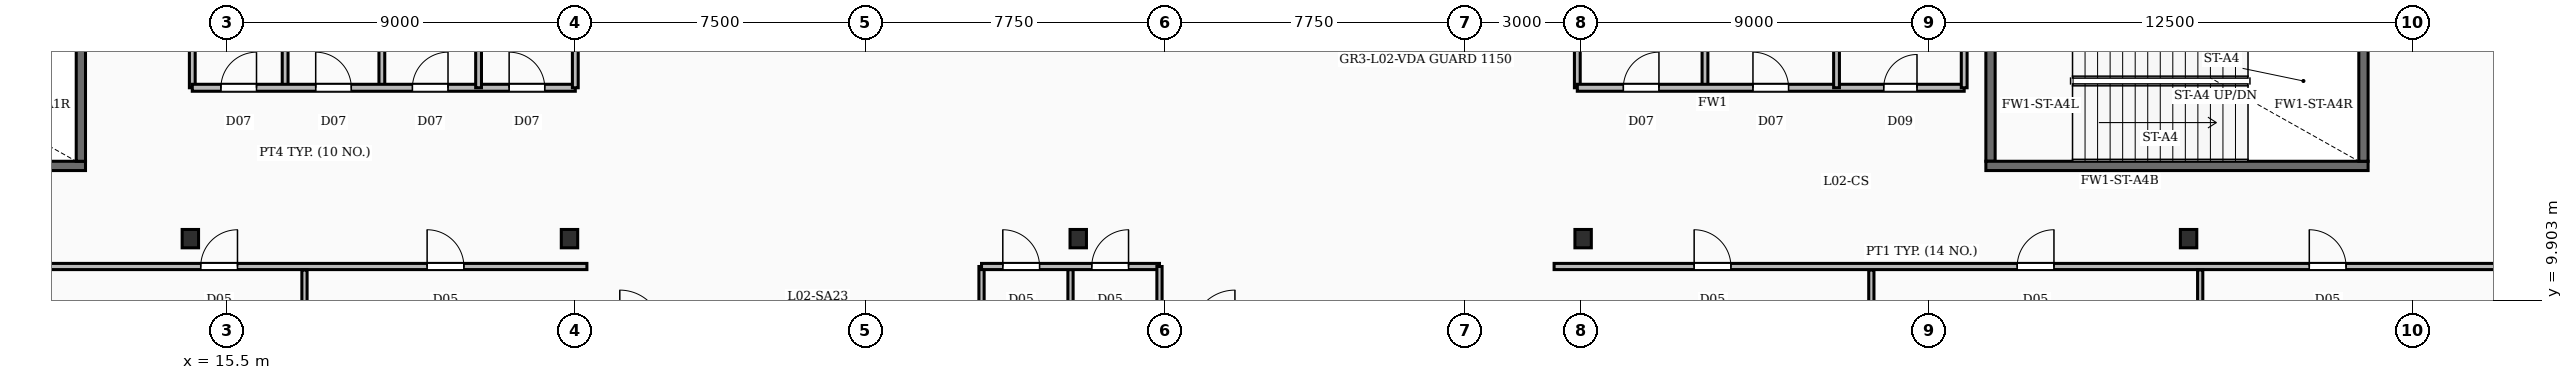
"""IFC4 building model, lengths in metres.
Left out: names, types, materials, properties, quantities, classifications, styles, units other than length and angle.
Written with IfcOpenShell. Run it as: python <this file> out.ifc"""

import sys

from ifc_helpers import new_model, si_unit, direction, frame, frame_2d, origin, origin_2d, place, context, subcontext, project, spatial, rectangle, i_section, extrude, element, fill, save


model = new_model("IFC4")
c1 = context("Model", 3, precision=1e-05, world=origin(), true_north=direction((0.0, 1.0)))
c2 = subcontext(c1, "Body", "Model", "MODEL_VIEW")
j1 = project(units=[si_unit("LENGTHUNIT", "METRE"), si_unit("PLANEANGLEUNIT", "RADIAN")], contexts=[c1])
p1 = place(None, origin())
s1 = spatial("IfcSite", under=j1, at=p1, CompositionType="ELEMENT")
p2 = place(p1, origin())
s2 = spatial("IfcBuilding", under=s1, at=p2, CompositionType="ELEMENT")
p3 = place(p2, frame((0.0, 0.0, 13.0)))
s3 = spatial("IfcBuildingStorey", under=s2, at=p3, CompositionType="ELEMENT", Elevation=13.0)
for number, where, z_axis, x_axis in (
    (1, (14.55, 11.5, -0.35), (0.0, 0.0, 1.0), (1.0, 0.0, 0.0)),
    (2, (24.35, 11.5, -0.35), (0.0, 0.0, 1.0), (1.0, 0.0, 0.0)),
    (3, (37.5, 11.5, -0.35), (0.0, 0.0, 1.0), (1.0, 0.0, 0.0)),
    (4, (50.55, 11.5, -0.35), (0.0, 0.0, 1.0), (1.0, 0.0, 0.0)),
    (5, (66.2, 11.5, -0.35), (0.0, 0.0, 1.0), (1.0, 0.0, 0.0)),
):
    element("IfcColumn", number, at=place(p3, frame(where, z_axis=z_axis, x_axis=x_axis)), inside=s3, PredefinedType="COLUMN", context=c2, shape_type="SweptSolid", body=[
        extrude(i_section(OverallWidth=0.424, OverallDepth=0.474, WebThickness=0.048, FlangeThickness=0.077, FilletRadius=0.02, at=origin_2d()), origin(), (0.0, 0.0, 1.0), 5.0),
    ])
p4 = place(p3, frame((1.96, 13.38, 0.0), z_axis=(0.0, 0.0, 1.0), x_axis=(1.0, 0.0, 0.0)))
e6 = element("IfcWall", 6, at=p4, inside=s3, PredefinedType="SOLIDWALL", context=c2, shape_type="SweptSolid", body=[
    extrude(rectangle(XDim=9.88, YDim=0.24, at=frame_2d((4.94, 0.0))), origin(), (0.0, 0.0, 1.0), 4.65),
])
p5 = place(p3, frame((11.72, 13.5, 0.0), z_axis=(0.0, 0.0, 1.0), x_axis=(0.0, 1.0, 0.0)))
e7 = element("IfcWall", 7, at=p5, inside=s3, PredefinedType="SOLIDWALL", context=c2, shape_type="SweptSolid", body=[
    extrude(rectangle(XDim=4.15, YDim=0.24, at=frame_2d((2.075, 0.0))), origin(), (0.0, 0.0, 1.0), 4.65),
])
p6 = place(p3, frame((60.96, 13.38, 0.0), z_axis=(0.0, 0.0, 1.0), x_axis=(1.0, 0.0, 0.0)))
e8 = element("IfcWall", 8, at=p6, inside=s3, PredefinedType="SOLIDWALL", context=c2, shape_type="SweptSolid", body=[
    extrude(rectangle(XDim=9.88, YDim=0.24, at=frame_2d((4.94, 0.0))), origin(), (0.0, 0.0, 1.0), 4.65),
])
for number, where, z_axis, x_axis in (
    (9, (61.08, 13.5, 0.0), (0.0, 0.0, 1.0), (0.0, 1.0, 0.0)),
    (10, (70.72, 13.5, 0.0), (0.0, 0.0, 1.0), (0.0, 1.0, 0.0)),
):
    element("IfcWall", number, at=place(p3, frame(where, z_axis=z_axis, x_axis=x_axis)), inside=s3, PredefinedType="SOLIDWALL", context=c2, shape_type="SweptSolid", body=[
        extrude(rectangle(XDim=4.15, YDim=0.24, at=frame_2d((2.075, 0.0))), origin(), (0.0, 0.0, 1.0), 4.65),
    ])
for number, where, z_axis, x_axis in (
    (11, (17.0, 15.4, 0.0), (0.0, 0.0, 1.0), (0.0, 1.0, 0.0)),
    (12, (19.5, 15.4, 0.0), (0.0, 0.0, 1.0), (0.0, 1.0, 0.0)),
    (13, (22.0, 15.4, 0.0), (0.0, 0.0, 1.0), (0.0, 1.0, 0.0)),
):
    element("IfcWall", number, at=place(p3, frame(where, z_axis=z_axis, x_axis=x_axis)), inside=s3, PredefinedType="PARTITIONING", context=c2, shape_type="SweptSolid", body=[
        extrude(rectangle(XDim=3.58, YDim=0.15, at=frame_2d((1.79, 0.0))), origin(), (0.0, 0.0, 1.0), 3.71),
    ])
p7 = place(p3, frame((14.6, 15.4, 0.0), z_axis=(0.0, 0.0, 1.0), x_axis=(1.0, 0.0, 0.0)))
e14 = element("IfcWall", 14, at=p7, inside=s3, PredefinedType="PARTITIONING", context=c2, shape_type="SweptSolid", body=[
    extrude(rectangle(XDim=9.9, YDim=0.18, at=frame_2d((4.95, 0.0))), origin(), (0.0, 0.0, 1.0), 3.71),
])
p8 = place(p7, frame((0.74, 0.0, 0.0)))
e15 = element("IfcOpeningElement", 15, at=p8, cuts=e14, PredefinedType="OPENING", context=c2, shape_type="SweptSolid", body=[
    extrude(rectangle(XDim=0.92, YDim=2.1, at=frame_2d((0.46, 1.05))), frame((0.0, 0.1, 0.0), z_axis=(0.0, -1.0, 0.0), x_axis=(1.0, 0.0, 0.0)), (0.0, 0.0, 1.0), 0.2),
])
p9 = place(p7, frame((3.19, 0.0, 0.0)))
e16 = element("IfcOpeningElement", 16, at=p9, cuts=e14, PredefinedType="OPENING", context=c2, shape_type="SweptSolid", body=[
    extrude(rectangle(XDim=0.92, YDim=2.1, at=frame_2d((0.46, 1.05))), frame((0.0, 0.1, 0.0), z_axis=(0.0, -1.0, 0.0), x_axis=(1.0, 0.0, 0.0)), (0.0, 0.0, 1.0), 0.2),
])
p10 = place(p7, frame((5.69, 0.0, 0.0)))
e17 = element("IfcOpeningElement", 17, at=p10, cuts=e14, PredefinedType="OPENING", context=c2, shape_type="SweptSolid", body=[
    extrude(rectangle(XDim=0.92, YDim=2.1, at=frame_2d((0.46, 1.05))), frame((0.0, 0.1, 0.0), z_axis=(0.0, -1.0, 0.0), x_axis=(1.0, 0.0, 0.0)), (0.0, 0.0, 1.0), 0.2),
])
p11 = place(p7, frame((8.19, 0.0, 0.0)))
e18 = element("IfcOpeningElement", 18, at=p11, cuts=e14, PredefinedType="OPENING", context=c2, shape_type="SweptSolid", body=[
    extrude(rectangle(XDim=0.92, YDim=2.1, at=frame_2d((0.46, 1.05))), frame((0.0, 0.1, 0.0), z_axis=(0.0, -1.0, 0.0), x_axis=(1.0, 0.0, 0.0)), (0.0, 0.0, 1.0), 0.2),
])
for number, where, z_axis, x_axis in (
    (19, (14.6, 15.4, 0.0), (0.0, 0.0, 1.0), (0.0, 1.0, 0.0)),
    (20, (24.5, 15.4, 0.0), (0.0, 0.0, 1.0), (0.0, 1.0, 0.0)),
    (21, (53.7, 15.4, 0.0), (0.0, 0.0, 1.0), (0.0, 1.0, 0.0)),
    (22, (57.1, 15.4, 0.0), (0.0, 0.0, 1.0), (0.0, 1.0, 0.0)),
):
    element("IfcWall", number, at=place(p3, frame(where, z_axis=z_axis, x_axis=x_axis)), inside=s3, PredefinedType="PARTITIONING", context=c2, shape_type="SweptSolid", body=[
        extrude(rectangle(XDim=3.58, YDim=0.15, at=frame_2d((1.79, 0.0))), origin(), (0.0, 0.0, 1.0), 3.71),
    ])
p12 = place(p3, frame((50.4, 15.4, 0.0), z_axis=(0.0, 0.0, 1.0), x_axis=(1.0, 0.0, 0.0)))
e23 = element("IfcWall", 23, at=p12, inside=s3, PredefinedType="SOLIDWALL", context=c2, shape_type="SweptSolid", body=[
    extrude(rectangle(XDim=10.0, YDim=0.18, at=frame_2d((5.0, 0.0))), origin(), (0.0, 0.0, 1.0), 3.71),
])
p13 = place(p12, frame((1.19, 0.0, 0.0)))
e24 = element("IfcOpeningElement", 24, at=p13, cuts=e23, PredefinedType="OPENING", context=c2, shape_type="SweptSolid", body=[
    extrude(rectangle(XDim=0.92, YDim=2.1, at=frame_2d((0.46, 1.05))), frame((0.0, 0.1, 0.0), z_axis=(0.0, -1.0, 0.0), x_axis=(1.0, 0.0, 0.0)), (0.0, 0.0, 1.0), 0.2),
])
p14 = place(p12, frame((4.54, 0.0, 0.0)))
e25 = element("IfcOpeningElement", 25, at=p14, cuts=e23, PredefinedType="OPENING", context=c2, shape_type="SweptSolid", body=[
    extrude(rectangle(XDim=0.92, YDim=2.1, at=frame_2d((0.46, 1.05))), frame((0.0, 0.1, 0.0), z_axis=(0.0, -1.0, 0.0), x_axis=(1.0, 0.0, 0.0)), (0.0, 0.0, 1.0), 0.2),
])
p15 = place(p12, frame((7.92, 0.0, 0.0)))
e26 = element("IfcOpeningElement", 26, at=p15, cuts=e23, PredefinedType="OPENING", context=c2, shape_type="SweptSolid", body=[
    extrude(rectangle(XDim=0.86, YDim=2.05, at=frame_2d((0.43, 1.025))), frame((0.0, 0.1, 0.0), z_axis=(0.0, -1.0, 0.0), x_axis=(1.0, 0.0, 0.0)), (0.0, 0.0, 1.0), 0.2),
])
for number, where, z_axis, x_axis in (
    (27, (50.4, 15.4, 0.0), (0.0, 0.0, 1.0), (0.0, 1.0, 0.0)),
    (28, (60.4, 15.4, 0.0), (0.0, 0.0, 1.0), (0.0, 1.0, 0.0)),
):
    element("IfcWall", number, at=place(p3, frame(where, z_axis=z_axis, x_axis=x_axis)), inside=s3, PredefinedType="PARTITIONING", context=c2, shape_type="SweptSolid", body=[
        extrude(rectangle(XDim=3.58, YDim=0.15, at=frame_2d((1.79, 0.0))), origin(), (0.0, 0.0, 1.0), 3.71),
    ])
p16 = place(p3, frame((17.5, 0.0, 0.0), z_axis=(0.0, 0.0, 1.0), x_axis=(0.0, 1.0, 0.0)))
e29 = element("IfcWall", 29, at=p16, inside=s3, PredefinedType="PARTITIONING", context=c2, shape_type="SweptSolid", body=[
    extrude(rectangle(XDim=10.69, YDim=0.135, at=frame_2d((5.345, 0.0))), origin(), (0.0, 0.0, 1.0), 3.71),
])
p17 = place(p16, frame((2.2, 0.0, 0.0)))
e30 = element("IfcOpeningElement", 30, at=p17, cuts=e29, PredefinedType="OPENING", context=c2, shape_type="SweptSolid", body=[
    extrude(rectangle(XDim=0.95, YDim=2.15, at=frame_2d((0.475, 1.075))), frame((0.0, 0.077, 0.0), z_axis=(0.0, -1.0, 0.0), x_axis=(1.0, 0.0, 0.0)), (0.0, 0.0, 1.0), 0.155),
])
p18 = place(p3, frame((0.0, 10.78, 0.0), z_axis=(0.0, 0.0, 1.0), x_axis=(1.0, 0.0, 0.0)))
e31 = element("IfcWall", 31, at=p18, inside=s3, PredefinedType="PARTITIONING", context=c2, shape_type="SweptSolid", body=[
    extrude(rectangle(XDim=24.8, YDim=0.16, at=frame_2d((12.4, 0.0))), origin(), (0.0, 0.0, 1.0), 3.71),
])
p19 = place(p18, frame((14.818, 0.0, 0.0)))
e32 = element("IfcOpeningElement", 32, at=p19, cuts=e31, PredefinedType="OPENING", context=c2, shape_type="SweptSolid", body=[
    extrude(rectangle(XDim=0.95, YDim=2.15, at=frame_2d((0.475, 1.075))), frame((0.0, 0.09, 0.0), z_axis=(0.0, -1.0, 0.0), x_axis=(1.0, 0.0, 0.0)), (0.0, 0.0, 1.0), 0.18),
])
p20 = place(p18, frame((20.67, 0.0, 0.0)))
e33 = element("IfcOpeningElement", 33, at=p20, cuts=e31, PredefinedType="OPENING", context=c2, shape_type="SweptSolid", body=[
    extrude(rectangle(XDim=0.95, YDim=2.15, at=frame_2d((0.475, 1.075))), frame((0.0, 0.09, 0.0), z_axis=(0.0, -1.0, 0.0), x_axis=(1.0, 0.0, 0.0)), (0.0, 0.0, 1.0), 0.18),
])
p21 = place(p3, frame((58.0, 0.0, 0.0), z_axis=(0.0, 0.0, 1.0), x_axis=(0.0, 1.0, 0.0)))
e34 = element("IfcWall", 34, at=p21, inside=s3, PredefinedType="PARTITIONING", context=c2, shape_type="SweptSolid", body=[
    extrude(rectangle(XDim=10.69, YDim=0.135, at=frame_2d((5.345, 0.0))), origin(), (0.0, 0.0, 1.0), 3.71),
])
p22 = place(p21, frame((2.2, 0.0, 0.0)))
e35 = element("IfcOpeningElement", 35, at=p22, cuts=e34, PredefinedType="OPENING", context=c2, shape_type="SweptSolid", body=[
    extrude(rectangle(XDim=0.95, YDim=2.15, at=frame_2d((0.475, 1.075))), frame((0.0, 0.077, 0.0), z_axis=(0.0, -1.0, 0.0), x_axis=(1.0, 0.0, 0.0)), (0.0, 0.0, 1.0), 0.155),
])
p23 = place(p3, frame((66.5, 0.0, 0.0), z_axis=(0.0, 0.0, 1.0), x_axis=(0.0, 1.0, 0.0)))
e36 = element("IfcWall", 36, at=p23, inside=s3, PredefinedType="PARTITIONING", context=c2, shape_type="SweptSolid", body=[
    extrude(rectangle(XDim=10.69, YDim=0.135, at=frame_2d((5.345, 0.0))), origin(), (0.0, 0.0, 1.0), 3.71),
])
p24 = place(p23, frame((2.2, 0.0, 0.0)))
e37 = element("IfcOpeningElement", 37, at=p24, cuts=e36, PredefinedType="OPENING", context=c2, shape_type="SweptSolid", body=[
    extrude(rectangle(XDim=0.95, YDim=2.15, at=frame_2d((0.475, 1.075))), frame((0.0, 0.077, 0.0), z_axis=(0.0, -1.0, 0.0), x_axis=(1.0, 0.0, 0.0)), (0.0, 0.0, 1.0), 0.155),
])
p25 = place(p3, frame((49.8, 10.78, 0.0), z_axis=(0.0, 0.0, 1.0), x_axis=(1.0, 0.0, 0.0)))
e38 = element("IfcWall", 38, at=p25, inside=s3, PredefinedType="PARTITIONING", context=c2, shape_type="SweptSolid", body=[
    extrude(rectangle(XDim=29.7, YDim=0.16, at=frame_2d((14.85, 0.0))), origin(), (0.0, 0.0, 1.0), 3.71),
])
p26 = place(p25, frame((3.62, 0.0, 0.0)))
e39 = element("IfcOpeningElement", 39, at=p26, cuts=e38, PredefinedType="OPENING", context=c2, shape_type="SweptSolid", body=[
    extrude(rectangle(XDim=0.95, YDim=2.15, at=frame_2d((0.475, 1.075))), frame((0.0, 0.09, 0.0), z_axis=(0.0, -1.0, 0.0), x_axis=(1.0, 0.0, 0.0)), (0.0, 0.0, 1.0), 0.18),
])
p27 = place(p25, frame((11.97, 0.0, 0.0)))
e40 = element("IfcOpeningElement", 40, at=p27, cuts=e38, PredefinedType="OPENING", context=c2, shape_type="SweptSolid", body=[
    extrude(rectangle(XDim=0.95, YDim=2.15, at=frame_2d((0.475, 1.075))), frame((0.0, 0.09, 0.0), z_axis=(0.0, -1.0, 0.0), x_axis=(1.0, 0.0, 0.0)), (0.0, 0.0, 1.0), 0.18),
])
p28 = place(p25, frame((19.52, 0.0, 0.0)))
e41 = element("IfcOpeningElement", 41, at=p28, cuts=e38, PredefinedType="OPENING", context=c2, shape_type="SweptSolid", body=[
    extrude(rectangle(XDim=0.95, YDim=2.15, at=frame_2d((0.475, 1.075))), frame((0.0, 0.09, 0.0), z_axis=(0.0, -1.0, 0.0), x_axis=(1.0, 0.0, 0.0)), (0.0, 0.0, 1.0), 0.18),
])
p29 = place(p3, frame((35.0, 10.78, 0.0), z_axis=(0.0, 0.0, 1.0), x_axis=(1.0, 0.0, 0.0)))
e42 = element("IfcWall", 42, at=p29, inside=s3, PredefinedType="PARTITIONING", context=c2, shape_type="SweptSolid", body=[
    extrude(rectangle(XDim=4.6, YDim=0.16, at=frame_2d((2.3, 0.0))), origin(), (0.0, 0.0, 1.0), 3.71),
])
p30 = place(p29, frame((0.55, 0.0, 0.0)))
e43 = element("IfcOpeningElement", 43, at=p30, cuts=e42, PredefinedType="OPENING", context=c2, shape_type="SweptSolid", body=[
    extrude(rectangle(XDim=0.95, YDim=2.15, at=frame_2d((0.475, 1.075))), frame((0.0, 0.09, 0.0), z_axis=(0.0, -1.0, 0.0), x_axis=(1.0, 0.0, 0.0)), (0.0, 0.0, 1.0), 0.18),
])
p31 = place(p29, frame((2.85, 0.0, 0.0)))
e44 = element("IfcOpeningElement", 44, at=p31, cuts=e42, PredefinedType="OPENING", context=c2, shape_type="SweptSolid", body=[
    extrude(rectangle(XDim=0.95, YDim=2.15, at=frame_2d((0.475, 1.075))), frame((0.0, 0.09, 0.0), z_axis=(0.0, -1.0, 0.0), x_axis=(1.0, 0.0, 0.0)), (0.0, 0.0, 1.0), 0.18),
])
p32 = place(p3, frame((37.3, 0.0, 0.0), z_axis=(0.0, 0.0, 1.0), x_axis=(0.0, 1.0, 0.0)))
e45 = element("IfcWall", 45, at=p32, inside=s3, PredefinedType="PARTITIONING", context=c2, shape_type="SweptSolid", body=[
    extrude(rectangle(XDim=10.7, YDim=0.135, at=frame_2d((5.35, 0.0))), origin(), (0.0, 0.0, 1.0), 3.71),
])
for number, where, z_axis, x_axis in (
    (46, (35.0, 0.0, 0.0), (0.0, 0.0, 1.0), (0.0, 1.0, 0.0)),
    (47, (39.6, 0.0, 0.0), (0.0, 0.0, 1.0), (0.0, 1.0, 0.0)),
):
    element("IfcWall", number, at=place(p3, frame(where, z_axis=z_axis, x_axis=x_axis)), inside=s3, PredefinedType="PARTITIONING", context=c2, shape_type="SweptSolid", body=[
        extrude(rectangle(XDim=10.78, YDim=0.135, at=frame_2d((5.39, 0.0))), origin(), (0.0, 0.0, 1.0), 3.71),
    ])
p33 = place(p8, origin())
e48 = element("IfcDoor", 48, at=p33, inside=s3, OperationType="SINGLE_SWING_RIGHT", PredefinedType="DOOR", context=c2, shape_type="SweptSolid", body=[
    extrude(rectangle(XDim=0.92, YDim=2.1, at=frame_2d((0.46, 1.05))), frame((0.0, 0.025, 0.0), z_axis=(0.0, -1.0, 0.0), x_axis=(1.0, 0.0, 0.0)), (0.0, 0.0, 1.0), 0.05),
])
fill(e15, e48)
p34 = place(p9, origin())
e49 = element("IfcDoor", 49, at=p34, inside=s3, OperationType="SINGLE_SWING_LEFT", PredefinedType="DOOR", context=c2, shape_type="SweptSolid", body=[
    extrude(rectangle(XDim=0.92, YDim=2.1, at=frame_2d((0.46, 1.05))), frame((0.0, 0.025, 0.0), z_axis=(0.0, -1.0, 0.0), x_axis=(1.0, 0.0, 0.0)), (0.0, 0.0, 1.0), 0.05),
])
fill(e16, e49)
p35 = place(p10, origin())
e50 = element("IfcDoor", 50, at=p35, inside=s3, OperationType="SINGLE_SWING_RIGHT", PredefinedType="DOOR", context=c2, shape_type="SweptSolid", body=[
    extrude(rectangle(XDim=0.92, YDim=2.1, at=frame_2d((0.46, 1.05))), frame((0.0, 0.025, 0.0), z_axis=(0.0, -1.0, 0.0), x_axis=(1.0, 0.0, 0.0)), (0.0, 0.0, 1.0), 0.05),
])
fill(e17, e50)
p36 = place(p11, origin())
e51 = element("IfcDoor", 51, at=p36, inside=s3, OperationType="SINGLE_SWING_LEFT", PredefinedType="DOOR", context=c2, shape_type="SweptSolid", body=[
    extrude(rectangle(XDim=0.92, YDim=2.1, at=frame_2d((0.46, 1.05))), frame((0.0, 0.025, 0.0), z_axis=(0.0, -1.0, 0.0), x_axis=(1.0, 0.0, 0.0)), (0.0, 0.0, 1.0), 0.05),
])
fill(e18, e51)
p37 = place(p13, origin())
e52 = element("IfcDoor", 52, at=p37, inside=s3, OperationType="SINGLE_SWING_RIGHT", PredefinedType="DOOR", context=c2, shape_type="SweptSolid", body=[
    extrude(rectangle(XDim=0.92, YDim=2.1, at=frame_2d((0.46, 1.05))), frame((0.0, 0.025, 0.0), z_axis=(0.0, -1.0, 0.0), x_axis=(1.0, 0.0, 0.0)), (0.0, 0.0, 1.0), 0.05),
])
fill(e24, e52)
p38 = place(p14, origin())
e53 = element("IfcDoor", 53, at=p38, inside=s3, OperationType="SINGLE_SWING_LEFT", PredefinedType="DOOR", context=c2, shape_type="SweptSolid", body=[
    extrude(rectangle(XDim=0.92, YDim=2.1, at=frame_2d((0.46, 1.05))), frame((0.0, 0.025, 0.0), z_axis=(0.0, -1.0, 0.0), x_axis=(1.0, 0.0, 0.0)), (0.0, 0.0, 1.0), 0.05),
])
fill(e25, e53)
p39 = place(p15, origin())
e54 = element("IfcDoor", 54, at=p39, inside=s3, OperationType="SINGLE_SWING_RIGHT", PredefinedType="DOOR", context=c2, shape_type="SweptSolid", body=[
    extrude(rectangle(XDim=0.86, YDim=2.05, at=frame_2d((0.43, 1.025))), frame((0.0, 0.025, 0.0), z_axis=(0.0, -1.0, 0.0), x_axis=(1.0, 0.0, 0.0)), (0.0, 0.0, 1.0), 0.05),
])
fill(e26, e54)
p40 = place(p19, origin())
e55 = element("IfcDoor", 55, at=p40, inside=s3, OperationType="SINGLE_SWING_RIGHT", PredefinedType="DOOR", context=c2, shape_type="SweptSolid", body=[
    extrude(rectangle(XDim=0.95, YDim=2.15, at=frame_2d((0.475, 1.075))), frame((0.0, 0.025, 0.0), z_axis=(0.0, -1.0, 0.0), x_axis=(1.0, 0.0, 0.0)), (0.0, 0.0, 1.0), 0.05),
])
fill(e32, e55)
p41 = place(p20, origin())
e56 = element("IfcDoor", 56, at=p41, inside=s3, OperationType="SINGLE_SWING_LEFT", PredefinedType="DOOR", context=c2, shape_type="SweptSolid", body=[
    extrude(rectangle(XDim=0.95, YDim=2.15, at=frame_2d((0.475, 1.075))), frame((0.0, 0.025, 0.0), z_axis=(0.0, -1.0, 0.0), x_axis=(1.0, 0.0, 0.0)), (0.0, 0.0, 1.0), 0.05),
])
fill(e33, e56)
p42 = place(p26, origin())
e57 = element("IfcDoor", 57, at=p42, inside=s3, OperationType="SINGLE_SWING_LEFT", PredefinedType="DOOR", context=c2, shape_type="SweptSolid", body=[
    extrude(rectangle(XDim=0.95, YDim=2.15, at=frame_2d((0.475, 1.075))), frame((0.0, 0.025, 0.0), z_axis=(0.0, -1.0, 0.0), x_axis=(1.0, 0.0, 0.0)), (0.0, 0.0, 1.0), 0.05),
])
fill(e39, e57)
p43 = place(p27, origin())
e58 = element("IfcDoor", 58, at=p43, inside=s3, OperationType="SINGLE_SWING_RIGHT", PredefinedType="DOOR", context=c2, shape_type="SweptSolid", body=[
    extrude(rectangle(XDim=0.95, YDim=2.15, at=frame_2d((0.475, 1.075))), frame((0.0, 0.025, 0.0), z_axis=(0.0, -1.0, 0.0), x_axis=(1.0, 0.0, 0.0)), (0.0, 0.0, 1.0), 0.05),
])
fill(e40, e58)
p44 = place(p28, origin())
e59 = element("IfcDoor", 59, at=p44, inside=s3, OperationType="SINGLE_SWING_LEFT", PredefinedType="DOOR", context=c2, shape_type="SweptSolid", body=[
    extrude(rectangle(XDim=0.95, YDim=2.15, at=frame_2d((0.475, 1.075))), frame((0.0, 0.025, 0.0), z_axis=(0.0, -1.0, 0.0), x_axis=(1.0, 0.0, 0.0)), (0.0, 0.0, 1.0), 0.05),
])
fill(e41, e59)
p45 = place(p30, origin())
e60 = element("IfcDoor", 60, at=p45, inside=s3, OperationType="SINGLE_SWING_LEFT", PredefinedType="DOOR", context=c2, shape_type="SweptSolid", body=[
    extrude(rectangle(XDim=0.95, YDim=2.15, at=frame_2d((0.475, 1.075))), frame((0.0, 0.025, 0.0), z_axis=(0.0, -1.0, 0.0), x_axis=(1.0, 0.0, 0.0)), (0.0, 0.0, 1.0), 0.05),
])
fill(e43, e60)
p46 = place(p31, origin())
e61 = element("IfcDoor", 61, at=p46, inside=s3, OperationType="SINGLE_SWING_RIGHT", PredefinedType="DOOR", context=c2, shape_type="SweptSolid", body=[
    extrude(rectangle(XDim=0.95, YDim=2.15, at=frame_2d((0.475, 1.075))), frame((0.0, 0.025, 0.0), z_axis=(0.0, -1.0, 0.0), x_axis=(1.0, 0.0, 0.0)), (0.0, 0.0, 1.0), 0.05),
])
fill(e44, e61)
save(model, sys.argv[1])
